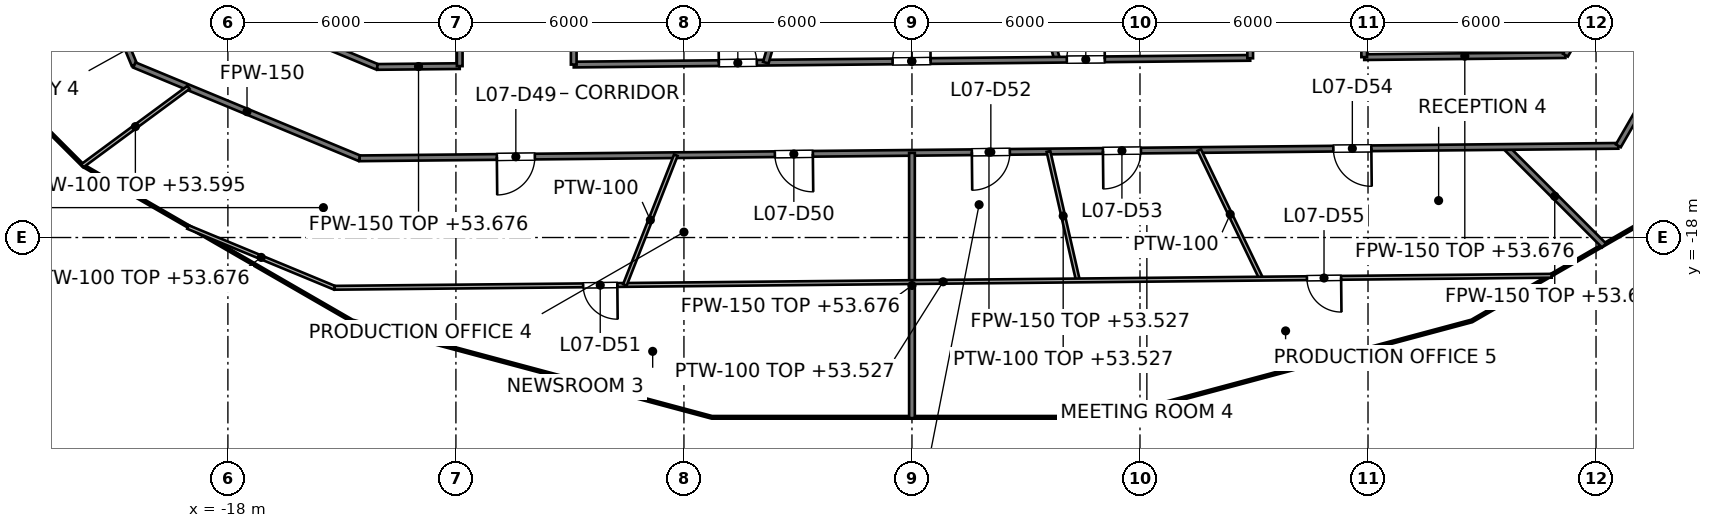
"""IFC4 building model, lengths in metres.
Left out: names, types, materials, properties, quantities, classifications, styles, units other than length and angle.
Written with IfcOpenShell. Run it as: python <this file> out.ifc"""

import sys

from ifc_helpers import new_model, si_unit, direction, frame, frame_2d, origin, place, context, subcontext, project, spatial, rectangle, extrude, element, fill, save


model = new_model("IFC4")
c1 = context("Model", 3, precision=1e-05, world=origin(), true_north=direction((0.0, 1.0)))
c2 = subcontext(c1, "Body", "Model", "MODEL_VIEW")
j1 = project(units=[si_unit("LENGTHUNIT", "METRE"), si_unit("PLANEANGLEUNIT", "RADIAN")], contexts=[c1])
p1 = place(None, origin())
s1 = spatial("IfcSite", under=j1, at=p1, CompositionType="ELEMENT")
p2 = place(p1, origin())
s2 = spatial("IfcBuilding", under=s1, at=p2, CompositionType="ELEMENT")
p3 = place(p2, frame((0.0, 0.0, 50.4)))
s3 = spatial("IfcBuildingStorey", under=s2, at=p3, CompositionType="ELEMENT", Elevation=50.4)
p4 = place(p3, frame((2.296, -8.0, 0.0), z_axis=(0.0, 0.0, 1.0), x_axis=(0.275935525478, -0.961176147113, 0.0)))
e1 = element("IfcWall", 1, at=p4, inside=s3, PredefinedType="PARTITIONING", context=c2, shape_type="SweptSolid", body=[
    extrude(rectangle(XDim=5.548, YDim=0.15, at=frame_2d((2.774, 0.0))), origin(), (0.0, 0.0, 1.0), 4.05),
])
p5 = place(p3, frame((-22.9, -7.572, 0.0), z_axis=(0.0, 0.0, 1.0), x_axis=(0.382860357704, -0.923806227788, 0.0)))
e2 = element("IfcWall", 2, at=p5, inside=s3, PredefinedType="PARTITIONING", context=c2, shape_type="SweptSolid", body=[
    extrude(rectangle(XDim=6.374, YDim=0.15, at=frame_2d((3.187, 0.0))), origin(), (0.0, 0.0, 1.0), 3.276),
])
p6 = place(p5, frame((2.637, 0.0, 0.0)))
e3 = element("IfcOpeningElement", 3, at=p6, cuts=e2, PredefinedType="OPENING", context=c2, shape_type="SweptSolid", body=[
    extrude(rectangle(XDim=1.0, YDim=2.1, at=frame_2d((0.5, 1.05))), frame((0.0, 0.075, 0.0), z_axis=(0.0, -1.0, 0.0), x_axis=(1.0, 0.0, 0.0)), (0.0, 0.0, 1.0), 0.15),
])
p7 = place(p3, frame((15.617, -15.617, 0.0), z_axis=(0.0, 0.0, 1.0), x_axis=(0.707106781187, -0.707106781187, 0.0)))
e4 = element("IfcWall", 4, at=p7, inside=s3, PredefinedType="PARTITIONING", context=c2, shape_type="SweptSolid", body=[
    extrude(rectangle(XDim=3.667, YDim=0.15, at=frame_2d((1.833, 0.0))), origin(), (0.0, 0.0, 1.0), 3.276),
])
p8 = place(p3, frame((-20.46, -13.46, 0.0), z_axis=(0.0, 0.0, 1.0), x_axis=(0.9237825057, -0.382917591869, 0.0)))
e5 = element("IfcWall", 5, at=p8, inside=s3, PredefinedType="PARTITIONING", context=c2, shape_type="SweptSolid", body=[
    extrude(rectangle(XDim=6.415, YDim=0.15, at=frame_2d((3.208, 0.0))), origin(), (0.0, 0.0, 1.0), 3.195),
])
p9 = place(p3, frame((-18.623, -11.623, 0.0), z_axis=(0.0, 0.0, 1.0), x_axis=(0.923791670587, -0.38289548098, 0.0)))
e6 = element("IfcWall", 6, at=p9, inside=s3, PredefinedType="PARTITIONING", context=c2, shape_type="SweptSolid", body=[
    extrude(rectangle(XDim=4.931, YDim=0.15, at=frame_2d((2.465, 0.0))), origin(), (0.0, 0.0, 1.0), 3.195),
])
p10 = place(p3, frame((-14.534, -15.916, 0.0), z_axis=(0.0, 0.0, 1.0), x_axis=(0.99995085722, 0.009913785652, 0.0)))
e7 = element("IfcWall", 7, at=p10, inside=s3, PredefinedType="PARTITIONING", context=c2, shape_type="SweptSolid", body=[
    extrude(rectangle(XDim=33.123, YDim=0.15, at=frame_2d((16.561, 0.0))), origin(), (0.0, 0.0, 1.0), 3.127),
])
p11 = place(p10, frame((3.611, 0.0, 0.0)))
e8 = element("IfcOpeningElement", 8, at=p11, cuts=e7, PredefinedType="OPENING", context=c2, shape_type="SweptSolid", body=[
    extrude(rectangle(XDim=1.0, YDim=2.1, at=frame_2d((0.5, 1.05))), frame((0.0, 0.075, 0.0), z_axis=(0.0, -1.0, 0.0), x_axis=(1.0, 0.0, 0.0)), (0.0, 0.0, 1.0), 0.15),
])
p12 = place(p10, frame((10.927, 0.0, 0.0)))
e9 = element("IfcOpeningElement", 9, at=p12, cuts=e7, PredefinedType="OPENING", context=c2, shape_type="SweptSolid", body=[
    extrude(rectangle(XDim=1.0, YDim=2.1, at=frame_2d((0.5, 1.05))), frame((0.0, 0.075, 0.0), z_axis=(0.0, -1.0, 0.0), x_axis=(1.0, 0.0, 0.0)), (0.0, 0.0, 1.0), 0.15),
])
p13 = place(p10, frame((16.11, 0.0, 0.0)))
e10 = element("IfcOpeningElement", 10, at=p13, cuts=e7, PredefinedType="OPENING", context=c2, shape_type="SweptSolid", body=[
    extrude(rectangle(XDim=1.0, YDim=2.1, at=frame_2d((0.5, 1.05))), frame((0.0, 0.075, 0.0), z_axis=(0.0, -1.0, 0.0), x_axis=(1.0, 0.0, 0.0)), (0.0, 0.0, 1.0), 0.15),
])
p14 = place(p10, frame((19.56, 0.0, 0.0)))
e11 = element("IfcOpeningElement", 11, at=p14, cuts=e7, PredefinedType="OPENING", context=c2, shape_type="SweptSolid", body=[
    extrude(rectangle(XDim=1.0, YDim=2.1, at=frame_2d((0.5, 1.05))), frame((0.0, 0.075, 0.0), z_axis=(0.0, -1.0, 0.0), x_axis=(1.0, 0.0, 0.0)), (0.0, 0.0, 1.0), 0.15),
])
p15 = place(p10, frame((25.623, 0.0, 0.0)))
e12 = element("IfcOpeningElement", 12, at=p15, cuts=e7, PredefinedType="OPENING", context=c2, shape_type="SweptSolid", body=[
    extrude(rectangle(XDim=1.0, YDim=2.1, at=frame_2d((0.5, 1.05))), frame((0.0, 0.075, 0.0), z_axis=(0.0, -1.0, 0.0), x_axis=(1.0, 0.0, 0.0)), (0.0, 0.0, 1.0), 0.15),
])
p16 = place(p3, frame((-14.068, -13.511, 0.0), z_axis=(0.0, 0.0, 1.0), x_axis=(0.999950911515, 0.009908307647, 0.0)))
e13 = element("IfcWall", 13, at=p16, inside=s3, PredefinedType="PARTITIONING", context=c2, shape_type="SweptSolid", body=[
    extrude(rectangle(XDim=2.168, YDim=0.15, at=frame_2d((1.084, 0.0))), origin(), (0.0, 0.0, 1.0), 3.276),
])
p17 = place(p3, frame((-8.9, -13.449, 0.0), z_axis=(0.0, 0.0, 1.0), x_axis=(0.999950834077, 0.009916119672, 0.0)))
e14 = element("IfcWall", 14, at=p17, inside=s3, PredefinedType="PARTITIONING", context=c2, shape_type="SweptSolid", body=[
    extrude(rectangle(XDim=17.801, YDim=0.15, at=frame_2d((8.9, 0.0))), origin(), (0.0, 0.0, 1.0), 3.127),
])
p18 = place(p17, frame((3.818, 0.0, 0.0)))
e15 = element("IfcOpeningElement", 15, at=p18, cuts=e14, PredefinedType="OPENING", context=c2, shape_type="SweptSolid", body=[
    extrude(rectangle(XDim=1.0, YDim=2.1, at=frame_2d((0.5, 1.05))), frame((0.0, 0.075, 0.0), z_axis=(0.0, -1.0, 0.0), x_axis=(1.0, 0.0, 0.0)), (0.0, 0.0, 1.0), 0.15),
])
p19 = place(p17, frame((8.391, 0.0, 0.0)))
e16 = element("IfcOpeningElement", 16, at=p19, cuts=e14, PredefinedType="OPENING", context=c2, shape_type="SweptSolid", body=[
    extrude(rectangle(XDim=1.0, YDim=2.1, at=frame_2d((0.5, 1.05))), frame((0.0, 0.075, 0.0), z_axis=(0.0, -1.0, 0.0), x_axis=(1.0, 0.0, 0.0)), (0.0, 0.0, 1.0), 0.15),
])
p20 = place(p17, frame((12.975, 0.0, 0.0)))
e17 = element("IfcOpeningElement", 17, at=p20, cuts=e14, PredefinedType="OPENING", context=c2, shape_type="SweptSolid", body=[
    extrude(rectangle(XDim=1.0, YDim=2.1, at=frame_2d((0.5, 1.05))), frame((0.0, 0.075, 0.0), z_axis=(0.0, -1.0, 0.0), x_axis=(1.0, 0.0, 0.0)), (0.0, 0.0, 1.0), 0.15),
])
p21 = place(p3, frame((11.9, -13.253, 0.0), z_axis=(0.0, 0.0, 1.0), x_axis=(0.999950853109, 0.009914200296, 0.0)))
e18 = element("IfcWall", 18, at=p21, inside=s3, PredefinedType="PARTITIONING", context=c2, shape_type="SweptSolid", body=[
    extrude(rectangle(XDim=5.294, YDim=0.15, at=frame_2d((2.647, 0.0))), origin(), (0.0, 0.0, 1.0), 3.276),
])
p22 = place(p3, frame((18.587, -15.587, 0.0), z_axis=(0.0, 0.0, 1.0), x_axis=(0.500026433136, 0.866010142069, 0.0)))
e19 = element("IfcWall", 19, at=p22, inside=s3, PredefinedType="PARTITIONING", context=c2, shape_type="SweptSolid", body=[
    extrude(rectangle(XDim=8.713, YDim=0.15, at=frame_2d((4.357, 0.0))), origin(), (0.0, 0.0, 1.0), 3.195),
])
p23 = place(p22, frame((3.226, 0.0, 0.0)))
e20 = element("IfcOpeningElement", 20, at=p23, cuts=e19, PredefinedType="OPENING", context=c2, shape_type="SweptSolid", body=[
    extrude(rectangle(XDim=1.0, YDim=2.1, at=frame_2d((0.5, 1.05))), frame((0.0, 0.075, 0.0), z_axis=(0.0, -1.0, 0.0), x_axis=(1.0, 0.0, 0.0)), (0.0, 0.0, 1.0), 0.15),
])
p24 = place(p3, frame((17.194, -13.201, 0.0), z_axis=(0.0, 0.0, 1.0), x_axis=(0.50001062018, 0.866019272134, 0.0)))
e21 = element("IfcWall", 21, at=p24, inside=s3, PredefinedType="PARTITIONING", context=c2, shape_type="SweptSolid", body=[
    extrude(rectangle(XDim=6.674, YDim=0.15, at=frame_2d((3.337, 0.0))), origin(), (0.0, 0.0, 1.0), 3.195),
])
p25 = place(p24, frame((2.833, 0.0, 0.0)))
e22 = element("IfcOpeningElement", 22, at=p25, cuts=e21, PredefinedType="OPENING", context=c2, shape_type="SweptSolid", body=[
    extrude(rectangle(XDim=1.0, YDim=2.1, at=frame_2d((0.5, 1.05))), frame((0.0, 0.075, 0.0), z_axis=(0.0, -1.0, 0.0), x_axis=(1.0, 0.0, 0.0)), (0.0, 0.0, 1.0), 0.15),
])
p26 = place(p3, frame((-3.846, -13.399, 0.0), z_axis=(0.0, 0.0, 1.0), x_axis=(0.275914969745, 0.961182048038, 0.0)))
e23 = element("IfcWall", 23, at=p26, inside=s3, PredefinedType="PARTITIONING", context=c2, shape_type="SweptSolid", body=[
    extrude(rectangle(XDim=5.617, YDim=0.15, at=frame_2d((2.809, 0.0))), origin(), (0.0, 0.0, 1.0), 4.05),
])
p27 = place(p3, frame((11.9, -13.253, 0.0), z_axis=(0.0, 0.0, 1.0), x_axis=(0.0, 1.0, 0.0)))
e24 = element("IfcWall", 24, at=p27, inside=s3, PredefinedType="PARTITIONING", context=c2, shape_type="SweptSolid", body=[
    extrude(rectangle(XDim=5.253, YDim=0.15, at=frame_2d((2.626, 0.0))), origin(), (0.0, 0.0, 1.0), 3.195),
])
p28 = place(p3, frame((8.9, -13.283, 0.0), z_axis=(0.0, 0.0, 1.0), x_axis=(0.0, 1.0, 0.0)))
e25 = element("IfcWall", 25, at=p28, inside=s3, PredefinedType="PARTITIONING", context=c2, shape_type="SweptSolid", body=[
    extrude(rectangle(XDim=5.283, YDim=0.15, at=frame_2d((2.642, 0.0))), origin(), (0.0, 0.0, 1.0), 3.127),
])
p29 = place(p3, frame((0.0, -22.752, 0.0), z_axis=(0.0, 0.0, 1.0), x_axis=(0.0, 1.0, 0.0)))
e26 = element("IfcWall", 26, at=p29, inside=s3, PredefinedType="PARTITIONING", context=c2, shape_type="SweptSolid", body=[
    extrude(rectangle(XDim=6.98, YDim=0.15, at=frame_2d((3.49, 0.0))), origin(), (0.0, 0.0, 1.0), 3.276),
])
p30 = place(p3, frame((-8.9, -13.449, 0.0), z_axis=(0.0, 0.0, 1.0), x_axis=(0.0, 1.0, 0.0)))
e27 = element("IfcWall", 27, at=p30, inside=s3, PredefinedType="PARTITIONING", context=c2, shape_type="SweptSolid", body=[
    extrude(rectangle(XDim=5.449, YDim=0.15, at=frame_2d((2.725, 0.0))), origin(), (0.0, 0.0, 1.0), 3.127),
])
p31 = place(p3, frame((-11.9, -13.49, 0.0), z_axis=(0.0, 0.0, 1.0), x_axis=(0.0, 1.0, 0.0)))
e28 = element("IfcWall", 28, at=p31, inside=s3, PredefinedType="PARTITIONING", context=c2, shape_type="SweptSolid", body=[
    extrude(rectangle(XDim=5.49, YDim=0.15, at=frame_2d((2.745, 0.0))), origin(), (0.0, 0.0, 1.0), 3.195),
])
p32 = place(p31, frame((2.245, 0.0, 0.0)))
e29 = element("IfcOpeningElement", 29, at=p32, cuts=e28, PredefinedType="OPENING", context=c2, shape_type="SweptSolid", body=[
    extrude(rectangle(XDim=1.0, YDim=2.1, at=frame_2d((0.5, 1.05))), frame((0.0, 0.075, 0.0), z_axis=(0.0, -1.0, 0.0), x_axis=(1.0, 0.0, 0.0)), (0.0, 0.0, 1.0), 0.15),
])
p33 = place(p3, frame((3.592, -15.736, 0.0), z_axis=(0.0, 0.0, 1.0), x_axis=(0.22239426517, -0.974956814848, 0.0)))
e30 = element("IfcWall", 30, at=p33, inside=s3, PredefinedType="PARTITIONING", context=c2, shape_type="SweptSolid", body=[
    extrude(rectangle(XDim=3.48, YDim=0.1, at=frame_2d((1.74, 0.0))), origin(), (0.0, 0.0, 1.0), 3.127),
])
p34 = place(p3, frame((7.559, -15.697, 0.0), z_axis=(0.0, 0.0, 1.0), x_axis=(0.433930919044, -0.900946145726, 0.0)))
e31 = element("IfcWall", 31, at=p34, inside=s3, PredefinedType="PARTITIONING", context=c2, shape_type="SweptSolid", body=[
    extrude(rectangle(XDim=3.756, YDim=0.1, at=frame_2d((1.878, 0.0))), origin(), (0.0, 0.0, 1.0), 4.05),
])
p35 = place(p3, frame((-19.052, -17.724, 0.0), z_axis=(0.0, 0.0, 1.0), x_axis=(0.923805162078, -0.382862929151, 0.0)))
e32 = element("IfcWall", 32, at=p35, inside=s3, PredefinedType="PARTITIONING", context=c2, shape_type="SweptSolid", body=[
    extrude(rectangle(XDim=4.176, YDim=0.1, at=frame_2d((2.088, 0.0))), origin(), (0.0, 0.0, 1.0), 3.276),
])
p36 = place(p3, frame((-15.194, -19.323, 0.0), z_axis=(0.0, 0.0, 1.0), x_axis=(0.999951203002, 0.009878846795, 0.0)))
e33 = element("IfcWall", 33, at=p36, inside=s3, PredefinedType="PARTITIONING", context=c2, shape_type="SweptSolid", body=[
    extrude(rectangle(XDim=32.029, YDim=0.1, at=frame_2d((16.014, 0.0))), origin(), (0.0, 0.0, 1.0), 3.127),
])
p37 = place(p36, frame((6.542, 0.0, 0.0)))
e34 = element("IfcOpeningElement", 34, at=p37, cuts=e33, PredefinedType="OPENING", context=c2, shape_type="SweptSolid", body=[
    extrude(rectangle(XDim=0.9, YDim=2.1, at=frame_2d((0.45, 1.05))), frame((0.0, 0.05, 0.0), z_axis=(0.0, -1.0, 0.0), x_axis=(1.0, 0.0, 0.0)), (0.0, 0.0, 1.0), 0.1),
])
p38 = place(p36, frame((25.588, 0.0, 0.0)))
e35 = element("IfcOpeningElement", 35, at=p38, cuts=e33, PredefinedType="OPENING", context=c2, shape_type="SweptSolid", body=[
    extrude(rectangle(XDim=0.9, YDim=2.1, at=frame_2d((0.45, 1.05))), frame((0.0, 0.05, 0.0), z_axis=(0.0, -1.0, 0.0), x_axis=(1.0, 0.0, 0.0)), (0.0, 0.0, 1.0), 0.1),
])
p39 = place(p3, frame((-21.832, -16.113, 0.0), z_axis=(0.0, 0.0, 1.0), x_axis=(0.804564485305, 0.59386529532, 0.0)))
e36 = element("IfcWall", 36, at=p39, inside=s3, PredefinedType="PARTITIONING", context=c2, shape_type="SweptSolid", body=[
    extrude(rectangle(XDim=3.474, YDim=0.1, at=frame_2d((1.737, 0.0))), origin(), (0.0, 0.0, 1.0), 3.195),
])
p40 = place(p3, frame((-7.554, -19.247, 0.0), z_axis=(0.0, 0.0, 1.0), x_axis=(0.365413393444, 0.930845342628, 0.0)))
e37 = element("IfcWall", 37, at=p40, inside=s3, PredefinedType="PARTITIONING", context=c2, shape_type="SweptSolid", body=[
    extrude(rectangle(XDim=3.667, YDim=0.1, at=frame_2d((1.833, 0.0))), origin(), (0.0, 0.0, 1.0), 4.05),
])
p41 = place(p18, origin())
e38 = element("IfcDoor", 38, at=p41, inside=s3, OperationType="SINGLE_SWING_LEFT", PredefinedType="DOOR", context=c2, shape_type="SweptSolid", body=[
    extrude(rectangle(XDim=1.0, YDim=2.1, at=frame_2d((0.5, 1.05))), frame((0.0, 0.025, 0.0), z_axis=(0.0, -1.0, 0.0), x_axis=(1.0, 0.0, 0.0)), (0.0, 0.0, 1.0), 0.05),
])
fill(e15, e38)
p42 = place(p19, origin())
e39 = element("IfcDoor", 39, at=p42, inside=s3, OperationType="SINGLE_SWING_RIGHT", PredefinedType="DOOR", context=c2, shape_type="SweptSolid", body=[
    extrude(rectangle(XDim=1.0, YDim=2.1, at=frame_2d((0.5, 1.05))), frame((0.0, 0.025, 0.0), z_axis=(0.0, -1.0, 0.0), x_axis=(1.0, 0.0, 0.0)), (0.0, 0.0, 1.0), 0.05),
])
fill(e16, e39)
p43 = place(p20, origin())
e40 = element("IfcDoor", 40, at=p43, inside=s3, OperationType="SINGLE_SWING_RIGHT", PredefinedType="DOOR", context=c2, shape_type="SweptSolid", body=[
    extrude(rectangle(XDim=1.0, YDim=2.1, at=frame_2d((0.5, 1.05))), frame((0.0, 0.025, 0.0), z_axis=(0.0, -1.0, 0.0), x_axis=(1.0, 0.0, 0.0)), (0.0, 0.0, 1.0), 0.05),
])
fill(e17, e40)
p44 = place(p11, origin())
e41 = element("IfcDoor", 41, at=p44, inside=s3, OperationType="SINGLE_SWING_LEFT", PredefinedType="DOOR", context=c2, shape_type="SweptSolid", body=[
    extrude(rectangle(XDim=1.0, YDim=2.1, at=frame_2d((0.5, 1.05))), frame((0.0, 0.025, 0.0), z_axis=(0.0, -1.0, 0.0), x_axis=(1.0, 0.0, 0.0)), (0.0, 0.0, 1.0), 0.05),
])
fill(e8, e41)
p45 = place(p12, origin())
e42 = element("IfcDoor", 42, at=p45, inside=s3, OperationType="SINGLE_SWING_RIGHT", PredefinedType="DOOR", context=c2, shape_type="SweptSolid", body=[
    extrude(rectangle(XDim=1.0, YDim=2.1, at=frame_2d((0.5, 1.05))), frame((0.0, 0.025, 0.0), z_axis=(0.0, -1.0, 0.0), x_axis=(1.0, 0.0, 0.0)), (0.0, 0.0, 1.0), 0.05),
])
fill(e9, e42)
p46 = place(p37, origin())
e43 = element("IfcDoor", 43, at=p46, inside=s3, OperationType="SINGLE_SWING_RIGHT", PredefinedType="DOOR", context=c2, shape_type="SweptSolid", body=[
    extrude(rectangle(XDim=0.9, YDim=2.1, at=frame_2d((0.45, 1.05))), frame((0.0, 0.025, 0.0), z_axis=(0.0, -1.0, 0.0), x_axis=(1.0, 0.0, 0.0)), (0.0, 0.0, 1.0), 0.05),
])
fill(e34, e43)
p47 = place(p13, origin())
e44 = element("IfcDoor", 44, at=p47, inside=s3, OperationType="SINGLE_SWING_LEFT", PredefinedType="DOOR", context=c2, shape_type="SweptSolid", body=[
    extrude(rectangle(XDim=1.0, YDim=2.1, at=frame_2d((0.5, 1.05))), frame((0.0, 0.025, 0.0), z_axis=(0.0, -1.0, 0.0), x_axis=(1.0, 0.0, 0.0)), (0.0, 0.0, 1.0), 0.05),
])
fill(e10, e44)
p48 = place(p14, origin())
e45 = element("IfcDoor", 45, at=p48, inside=s3, OperationType="SINGLE_SWING_LEFT", PredefinedType="DOOR", context=c2, shape_type="SweptSolid", body=[
    extrude(rectangle(XDim=1.0, YDim=2.1, at=frame_2d((0.5, 1.05))), frame((0.0, 0.025, 0.0), z_axis=(0.0, -1.0, 0.0), x_axis=(1.0, 0.0, 0.0)), (0.0, 0.0, 1.0), 0.05),
])
fill(e11, e45)
p49 = place(p15, origin())
e46 = element("IfcDoor", 46, at=p49, inside=s3, OperationType="SINGLE_SWING_RIGHT", PredefinedType="DOOR", context=c2, shape_type="SweptSolid", body=[
    extrude(rectangle(XDim=1.0, YDim=2.1, at=frame_2d((0.5, 1.05))), frame((0.0, 0.025, 0.0), z_axis=(0.0, -1.0, 0.0), x_axis=(1.0, 0.0, 0.0)), (0.0, 0.0, 1.0), 0.05),
])
fill(e12, e46)
p50 = place(p38, origin())
e47 = element("IfcDoor", 47, at=p50, inside=s3, OperationType="SINGLE_SWING_RIGHT", PredefinedType="DOOR", context=c2, shape_type="SweptSolid", body=[
    extrude(rectangle(XDim=0.9, YDim=2.1, at=frame_2d((0.45, 1.05))), frame((0.0, 0.025, 0.0), z_axis=(0.0, -1.0, 0.0), x_axis=(1.0, 0.0, 0.0)), (0.0, 0.0, 1.0), 0.05),
])
fill(e35, e47)
save(model, sys.argv[1])
